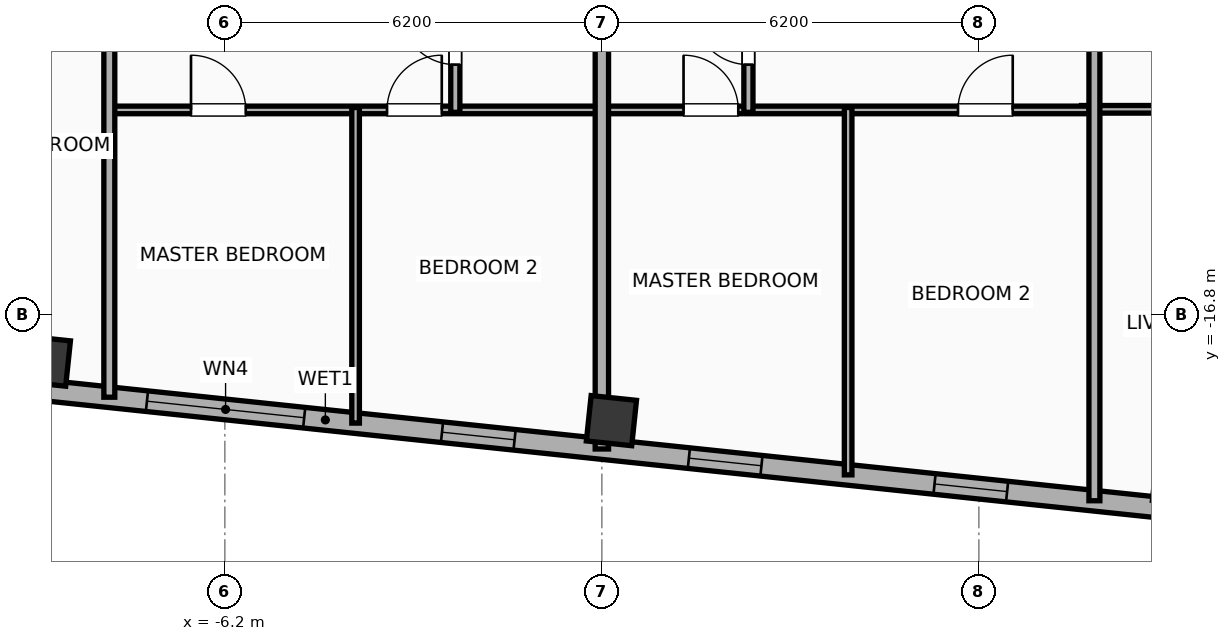
"""IFC4 building model, lengths in metres.
Left out: names, types, materials, properties, quantities, classifications, styles, units other than length and angle.
Written with IfcOpenShell. Run it as: python <this file> out.ifc"""

import sys

from ifc_helpers import new_model, si_unit, direction, frame, frame_2d, origin, origin_2d, place, context, subcontext, project, spatial, rectangle, hollow_rectangle, extrude, element, fill, save


model = new_model("IFC4")
c1 = context("Model", 3, precision=1e-05, world=origin(), true_north=direction((0.0, 1.0)))
c2 = subcontext(c1, "Body", "Model", "MODEL_VIEW")
j1 = project(units=[si_unit("LENGTHUNIT", "METRE"), si_unit("PLANEANGLEUNIT", "RADIAN")], contexts=[c1])
p1 = place(None, origin())
s1 = spatial("IfcSite", under=j1, at=p1, CompositionType="ELEMENT")
p2 = place(p1, origin())
s2 = spatial("IfcBuilding", under=s1, at=p2, CompositionType="ELEMENT")
p3 = place(p2, frame((0.0, 0.0, 295.1)))
s3 = spatial("IfcBuildingStorey", under=s2, at=p3, CompositionType="ELEMENT", Elevation=295.1)
for number, where, z_axis, x_axis in (
    (1, (-9.152, -17.561, 0.0), (0.0, 0.0, 1.0), (0.995, -0.105, 0.0)),
    (2, (0.157, -18.54, 0.0), (0.0, 0.0, 1.0), (0.995, -0.105, 0.0)),
):
    element("IfcColumn", number, at=place(p3, frame(where, z_axis=z_axis, x_axis=x_axis)), inside=s3, PredefinedType="COLUMN", context=c2, shape_type="SweptSolid", body=[
        extrude(hollow_rectangle(XDim=0.75, YDim=0.75, WallThickness=0.025, at=origin_2d()), origin(), (0.0, 0.0, 1.0), 3.9),
    ])
p4 = place(p3, frame((18.708, -20.972, 0.0), z_axis=(0.0, 0.0, 1.0), x_axis=(-0.994521888554, 0.104528528102, 0.0)))
e3 = element("IfcWall", 3, at=p4, inside=s3, PredefinedType="ELEMENTEDWALL", context=c2, shape_type="SweptSolid", body=[
    extrude(rectangle(XDim=46.766, YDim=0.34, at=frame_2d((23.383, 0.0))), origin(), (0.0, 0.0, 1.0), 3.635),
])
p5 = place(p4, frame((23.733, 0.0, 0.65)))
e4 = element("IfcOpeningElement", 4, at=p5, cuts=e3, PredefinedType="OPENING", context=c2, shape_type="SweptSolid", body=[
    extrude(rectangle(XDim=2.6, YDim=2.45, at=frame_2d((1.3, 1.225))), frame((0.0, 0.18, 0.0), z_axis=(0.0, -1.0, 0.0), x_axis=(1.0, 0.0, 0.0)), (0.0, 0.0, 1.0), 0.36),
])
p6 = place(p4, frame((44.402, 0.0, 0.75)))
e5 = element("IfcOpeningElement", 5, at=p6, cuts=e3, PredefinedType="OPENING", context=c2, shape_type="SweptSolid", body=[
    extrude(rectangle(XDim=1.2, YDim=2.05, at=frame_2d((0.6, 1.025))), frame((0.0, 0.18, 0.0), z_axis=(0.0, -1.0, 0.0), x_axis=(1.0, 0.0, 0.0)), (0.0, 0.0, 1.0), 0.36),
])
p7 = place(p4, frame((39.553, 0.0, 0.75)))
e6 = element("IfcOpeningElement", 6, at=p7, cuts=e3, PredefinedType="OPENING", context=c2, shape_type="SweptSolid", body=[
    extrude(rectangle(XDim=1.2, YDim=2.05, at=frame_2d((0.6, 1.025))), frame((0.0, 0.18, 0.0), z_axis=(0.0, -1.0, 0.0), x_axis=(1.0, 0.0, 0.0)), (0.0, 0.0, 1.0), 0.36),
])
p8 = place(p4, frame((42.419, 0.0, 0.75)))
e7 = element("IfcOpeningElement", 7, at=p8, cuts=e3, PredefinedType="OPENING", context=c2, shape_type="SweptSolid", body=[
    extrude(rectangle(XDim=1.2, YDim=2.05, at=frame_2d((0.6, 1.025))), frame((0.0, 0.18, 0.0), z_axis=(0.0, -1.0, 0.0), x_axis=(1.0, 0.0, 0.0)), (0.0, 0.0, 1.0), 0.36),
])
p9 = place(p4, frame((34.933, 0.0, 0.75)))
e8 = element("IfcOpeningElement", 8, at=p9, cuts=e3, PredefinedType="OPENING", context=c2, shape_type="SweptSolid", body=[
    extrude(rectangle(XDim=1.2, YDim=2.05, at=frame_2d((0.6, 1.025))), frame((0.0, 0.18, 0.0), z_axis=(0.0, -1.0, 0.0), x_axis=(1.0, 0.0, 0.0)), (0.0, 0.0, 1.0), 0.36),
])
p10 = place(p4, frame((28.692, 0.0, 0.75)))
e9 = element("IfcOpeningElement", 9, at=p10, cuts=e3, PredefinedType="OPENING", context=c2, shape_type="SweptSolid", body=[
    extrude(rectangle(XDim=1.2, YDim=2.05, at=frame_2d((0.6, 1.025))), frame((0.0, 0.18, 0.0), z_axis=(0.0, -1.0, 0.0), x_axis=(1.0, 0.0, 0.0)), (0.0, 0.0, 1.0), 0.36),
])
p11 = place(p4, frame((30.957, 0.0, 0.75)))
e10 = element("IfcOpeningElement", 10, at=p11, cuts=e3, PredefinedType="OPENING", context=c2, shape_type="SweptSolid", body=[
    extrude(rectangle(XDim=1.2, YDim=2.05, at=frame_2d((0.6, 1.025))), frame((0.0, 0.18, 0.0), z_axis=(0.0, -1.0, 0.0), x_axis=(1.0, 0.0, 0.0)), (0.0, 0.0, 1.0), 0.36),
])
p12 = place(p4, frame((7.495, 0.0, 0.75)))
e11 = element("IfcOpeningElement", 11, at=p12, cuts=e3, PredefinedType="OPENING", context=c2, shape_type="SweptSolid", body=[
    extrude(rectangle(XDim=1.2, YDim=2.05, at=frame_2d((0.6, 1.025))), frame((0.0, 0.18, 0.0), z_axis=(0.0, -1.0, 0.0), x_axis=(1.0, 0.0, 0.0)), (0.0, 0.0, 1.0), 0.36),
])
p13 = place(p4, frame((4.146, 0.0, 0.75)))
e12 = element("IfcOpeningElement", 12, at=p13, cuts=e3, PredefinedType="OPENING", context=c2, shape_type="SweptSolid", body=[
    extrude(rectangle(XDim=1.2, YDim=2.05, at=frame_2d((0.6, 1.025))), frame((0.0, 0.18, 0.0), z_axis=(0.0, -1.0, 0.0), x_axis=(1.0, 0.0, 0.0)), (0.0, 0.0, 1.0), 0.36),
])
p14 = place(p4, frame((1.362, 0.0, 0.75)))
e13 = element("IfcOpeningElement", 13, at=p14, cuts=e3, PredefinedType="OPENING", context=c2, shape_type="SweptSolid", body=[
    extrude(rectangle(XDim=1.2, YDim=2.05, at=frame_2d((0.6, 1.025))), frame((0.0, 0.18, 0.0), z_axis=(0.0, -1.0, 0.0), x_axis=(1.0, 0.0, 0.0)), (0.0, 0.0, 1.0), 0.36),
])
p15 = place(p4, frame((20.254, 0.0, 0.75)))
e14 = element("IfcOpeningElement", 14, at=p15, cuts=e3, PredefinedType="OPENING", context=c2, shape_type="SweptSolid", body=[
    extrude(rectangle(XDim=1.2, YDim=2.05, at=frame_2d((0.6, 1.025))), frame((0.0, 0.18, 0.0), z_axis=(0.0, -1.0, 0.0), x_axis=(1.0, 0.0, 0.0)), (0.0, 0.0, 1.0), 0.36),
])
p16 = place(p4, frame((16.172, 0.0, 0.75)))
e15 = element("IfcOpeningElement", 15, at=p16, cuts=e3, PredefinedType="OPENING", context=c2, shape_type="SweptSolid", body=[
    extrude(rectangle(XDim=1.2, YDim=2.05, at=frame_2d((0.6, 1.025))), frame((0.0, 0.18, 0.0), z_axis=(0.0, -1.0, 0.0), x_axis=(1.0, 0.0, 0.0)), (0.0, 0.0, 1.0), 0.36),
])
p17 = place(p4, frame((12.11, 0.0, 0.75)))
e16 = element("IfcOpeningElement", 16, at=p17, cuts=e3, PredefinedType="OPENING", context=c2, shape_type="SweptSolid", body=[
    extrude(rectangle(XDim=1.2, YDim=2.05, at=frame_2d((0.6, 1.025))), frame((0.0, 0.18, 0.0), z_axis=(0.0, -1.0, 0.0), x_axis=(1.0, 0.0, 0.0)), (0.0, 0.0, 1.0), 0.36),
])
p18 = place(p3, frame((7.887, -13.42, 0.0), z_axis=(0.0, 0.0, 1.0), x_axis=(1.0, 0.0, 0.0)))
e17 = element("IfcWall", 17, at=p18, inside=s3, PredefinedType="PARTITIONING", context=c2, shape_type="SweptSolid", body=[
    extrude(rectangle(XDim=2.623, YDim=0.125, at=frame_2d((1.311, 0.0))), origin(), (0.0, 0.0, 1.0), 3.635),
])
p19 = place(p3, frame((-8.08, -13.43, 0.0), z_axis=(0.0, 0.0, 1.0), x_axis=(1.0, 0.0, 0.0)))
e18 = element("IfcWall", 18, at=p19, inside=s3, PredefinedType="PARTITIONING", context=c2, shape_type="SweptSolid", body=[
    extrude(rectangle(XDim=8.06, YDim=0.125, at=frame_2d((4.03, 0.0))), origin(), (0.0, 0.0, 1.0), 3.635),
])
p20 = place(p19, frame((1.323, 0.0, 0.0)))
e19 = element("IfcOpeningElement", 19, at=p20, cuts=e18, PredefinedType="OPENING", context=c2, shape_type="SweptSolid", body=[
    extrude(rectangle(XDim=0.9, YDim=2.05, at=frame_2d((0.45, 1.025))), frame((0.0, 0.073, 0.0), z_axis=(0.0, -1.0, 0.0), x_axis=(1.0, 0.0, 0.0)), (0.0, 0.0, 1.0), 0.145),
])
p21 = place(p19, frame((4.547, 0.0, 0.0)))
e20 = element("IfcOpeningElement", 20, at=p21, cuts=e18, PredefinedType="OPENING", context=c2, shape_type="SweptSolid", body=[
    extrude(rectangle(XDim=0.9, YDim=2.05, at=frame_2d((0.45, 1.025))), frame((0.0, 0.073, 0.0), z_axis=(0.0, -1.0, 0.0), x_axis=(1.0, 0.0, 0.0)), (0.0, 0.0, 1.0), 0.145),
])
p22 = place(p3, frame((-2.41, -13.47, 0.0), z_axis=(0.0, 0.0, 1.0), x_axis=(0.0, 1.0, 0.0)))
e21 = element("IfcWall", 21, at=p22, inside=s3, PredefinedType="PLUMBINGWALL", context=c2, shape_type="SweptSolid", body=[
    extrude(rectangle(XDim=2.47, YDim=0.15, at=frame_2d((1.235, 0.0))), origin(), (0.0, 0.0, 1.0), 3.635),
])
p23 = place(p22, frame((0.785, 0.0, 0.0)))
e22 = element("IfcOpeningElement", 22, at=p23, cuts=e21, PredefinedType="OPENING", context=c2, shape_type="SweptSolid", body=[
    extrude(rectangle(XDim=0.9, YDim=2.05, at=frame_2d((0.45, 1.025))), frame((0.0, 0.085, 0.0), z_axis=(0.0, -1.0, 0.0), x_axis=(1.0, 0.0, 0.0)), (0.0, 0.0, 1.0), 0.17),
])
p24 = place(p3, frame((-4.05, -18.58, 0.0), z_axis=(0.0, 0.0, 1.0), x_axis=(0.0, 1.0, 0.0)))
e23 = element("IfcWall", 23, at=p24, inside=s3, PredefinedType="PARTITIONING", context=c2, shape_type="SweptSolid", body=[
    extrude(rectangle(XDim=5.19, YDim=0.125, at=frame_2d((2.595, 0.0))), origin(), (0.0, 0.0, 1.0), 3.635),
])
p25 = place(p3, frame((-8.1, -18.155, 0.0), z_axis=(0.0, 0.0, 1.0), x_axis=(0.0, 1.0, 0.0)))
e24 = element("IfcWall", 24, at=p25, inside=s3, PredefinedType="PARTITIONING", context=c2, shape_type="SweptSolid", body=[
    extrude(rectangle(XDim=9.564, YDim=0.18, at=frame_2d((4.782, 0.0))), origin(), (0.0, 0.0, 1.0), 3.635),
])
p26 = place(p25, frame((8.315, 0.0, 0.0)))
e25 = element("IfcOpeningElement", 25, at=p26, cuts=e24, PredefinedType="OPENING", context=c2, shape_type="SweptSolid", body=[
    extrude(rectangle(XDim=0.9, YDim=2.05, at=frame_2d((0.45, 1.025))), frame((0.0, 0.1, 0.0), z_axis=(0.0, -1.0, 0.0), x_axis=(1.0, 0.0, 0.0)), (0.0, 0.0, 1.0), 0.2),
])
p27 = place(p3, frame((0.02, -13.43, 0.0), z_axis=(0.0, 0.0, 1.0), x_axis=(1.0, 0.0, 0.0)))
e26 = element("IfcWall", 26, at=p27, inside=s3, PredefinedType="PARTITIONING", context=c2, shape_type="SweptSolid", body=[
    extrude(rectangle(XDim=7.992, YDim=0.125, at=frame_2d((3.996, 0.0))), origin(), (0.0, 0.0, 1.0), 3.635),
])
p28 = place(p27, frame((1.323, 0.0, 0.0)))
e27 = element("IfcOpeningElement", 27, at=p28, cuts=e26, PredefinedType="OPENING", context=c2, shape_type="SweptSolid", body=[
    extrude(rectangle(XDim=0.9, YDim=2.05, at=frame_2d((0.45, 1.025))), frame((0.0, 0.073, 0.0), z_axis=(0.0, -1.0, 0.0), x_axis=(1.0, 0.0, 0.0)), (0.0, 0.0, 1.0), 0.145),
])
p29 = place(p27, frame((5.837, 0.0, 0.0)))
e28 = element("IfcOpeningElement", 28, at=p29, cuts=e26, PredefinedType="OPENING", context=c2, shape_type="SweptSolid", body=[
    extrude(rectangle(XDim=0.9, YDim=2.05, at=frame_2d((0.45, 1.025))), frame((0.0, 0.073, 0.0), z_axis=(0.0, -1.0, 0.0), x_axis=(1.0, 0.0, 0.0)), (0.0, 0.0, 1.0), 0.145),
])
p30 = place(p3, frame((2.41, -13.47, 0.0), z_axis=(0.0, 0.0, 1.0), x_axis=(0.0, 1.0, 0.0)))
e29 = element("IfcWall", 29, at=p30, inside=s3, PredefinedType="PLUMBINGWALL", context=c2, shape_type="SweptSolid", body=[
    extrude(rectangle(XDim=2.47, YDim=0.15, at=frame_2d((1.235, 0.0))), origin(), (0.0, 0.0, 1.0), 3.075),
])
p31 = place(p30, frame((0.785, 0.0, 0.0)))
e30 = element("IfcOpeningElement", 30, at=p31, cuts=e29, PredefinedType="OPENING", context=c2, shape_type="SweptSolid", body=[
    extrude(rectangle(XDim=0.9, YDim=2.05, at=frame_2d((0.45, 1.025))), frame((0.0, 0.085, 0.0), z_axis=(0.0, -1.0, 0.0), x_axis=(1.0, 0.0, 0.0)), (0.0, 0.0, 1.0), 0.17),
])
p32 = place(p3, frame((4.05, -19.432, 0.0), z_axis=(0.0, 0.0, 1.0), x_axis=(0.0, 1.0, 0.0)))
e31 = element("IfcWall", 31, at=p32, inside=s3, PredefinedType="PARTITIONING", context=c2, shape_type="SweptSolid", body=[
    extrude(rectangle(XDim=6.042, YDim=0.125, at=frame_2d((3.021, 0.0))), origin(), (0.0, 0.0, 1.0), 3.635),
])
p33 = place(p3, frame((8.1, -19.857, 0.0), z_axis=(0.0, 0.0, 1.0), x_axis=(0.0, 1.0, 0.0)))
e32 = element("IfcWall", 32, at=p33, inside=s3, PredefinedType="PARTITIONING", context=c2, shape_type="SweptSolid", body=[
    extrude(rectangle(XDim=11.267, YDim=0.18, at=frame_2d((5.634, 0.0))), origin(), (0.0, 0.0, 1.0), 3.635),
])
p34 = place(p33, frame((10.017, 0.0, 0.0)))
e33 = element("IfcOpeningElement", 33, at=p34, cuts=e32, PredefinedType="OPENING", context=c2, shape_type="SweptSolid", body=[
    extrude(rectangle(XDim=0.9, YDim=2.05, at=frame_2d((0.45, 1.025))), frame((0.0, 0.1, 0.0), z_axis=(0.0, -1.0, 0.0), x_axis=(1.0, 0.0, 0.0)), (0.0, 0.0, 1.0), 0.2),
])
p35 = place(p3, frame((0.0, -19.006, 0.0), z_axis=(0.0, 0.0, 1.0), x_axis=(0.0, 1.0, 0.0)))
e34 = element("IfcWall", 34, at=p35, inside=s3, PredefinedType="PARTITIONING", context=c2, shape_type="SweptSolid", body=[
    extrude(rectangle(XDim=10.416, YDim=0.22, at=frame_2d((5.208, 0.0))), origin(), (0.0, 0.0, 1.0), 3.635),
])
p36 = place(p5, origin())
e35 = element("IfcWindow", 35, at=p36, inside=s3, PartitioningType="SINGLE_PANEL", PredefinedType="WINDOW", context=c2, shape_type="SweptSolid", body=[
    extrude(rectangle(XDim=2.6, YDim=2.45, at=frame_2d((1.3, 1.225))), frame((0.0, 0.03, 0.0), z_axis=(0.0, -1.0, 0.0), x_axis=(1.0, 0.0, 0.0)), (0.0, 0.0, 1.0), 0.06),
])
fill(e4, e35)
p37 = place(p15, origin())
e36 = element("IfcWindow", 36, at=p37, inside=s3, PartitioningType="SINGLE_PANEL", PredefinedType="WINDOW", context=c2, shape_type="SweptSolid", body=[
    extrude(rectangle(XDim=1.2, YDim=2.05, at=frame_2d((0.6, 1.025))), frame((0.0, 0.03, 0.0), z_axis=(0.0, -1.0, 0.0), x_axis=(1.0, 0.0, 0.0)), (0.0, 0.0, 1.0), 0.06),
])
fill(e14, e36)
p38 = place(p16, origin())
e37 = element("IfcWindow", 37, at=p38, inside=s3, PartitioningType="SINGLE_PANEL", PredefinedType="WINDOW", context=c2, shape_type="SweptSolid", body=[
    extrude(rectangle(XDim=1.2, YDim=2.05, at=frame_2d((0.6, 1.025))), frame((0.0, 0.03, 0.0), z_axis=(0.0, -1.0, 0.0), x_axis=(1.0, 0.0, 0.0)), (0.0, 0.0, 1.0), 0.06),
])
fill(e15, e37)
p39 = place(p17, origin())
e38 = element("IfcWindow", 38, at=p39, inside=s3, PartitioningType="SINGLE_PANEL", PredefinedType="WINDOW", context=c2, shape_type="SweptSolid", body=[
    extrude(rectangle(XDim=1.2, YDim=2.05, at=frame_2d((0.6, 1.025))), frame((0.0, 0.03, 0.0), z_axis=(0.0, -1.0, 0.0), x_axis=(1.0, 0.0, 0.0)), (0.0, 0.0, 1.0), 0.06),
])
fill(e16, e38)
p40 = place(p20, origin())
e39 = element("IfcDoor", 39, at=p40, inside=s3, OperationType="SINGLE_SWING_LEFT", PredefinedType="DOOR", context=c2, shape_type="SweptSolid", body=[
    extrude(rectangle(XDim=0.9, YDim=2.05, at=frame_2d((0.45, 1.025))), frame((0.0, 0.025, 0.0), z_axis=(0.0, -1.0, 0.0), x_axis=(1.0, 0.0, 0.0)), (0.0, 0.0, 1.0), 0.05),
])
fill(e19, e39)
p41 = place(p21, origin())
e40 = element("IfcDoor", 40, at=p41, inside=s3, OperationType="SINGLE_SWING_RIGHT", PredefinedType="DOOR", context=c2, shape_type="SweptSolid", body=[
    extrude(rectangle(XDim=0.9, YDim=2.05, at=frame_2d((0.45, 1.025))), frame((0.0, 0.025, 0.0), z_axis=(0.0, -1.0, 0.0), x_axis=(1.0, 0.0, 0.0)), (0.0, 0.0, 1.0), 0.05),
])
fill(e20, e40)
p42 = place(p23, origin())
e41 = element("IfcDoor", 41, at=p42, inside=s3, OperationType="SINGLE_SWING_RIGHT", PredefinedType="DOOR", context=c2, shape_type="SweptSolid", body=[
    extrude(rectangle(XDim=0.9, YDim=2.05, at=frame_2d((0.45, 1.025))), frame((0.0, 0.025, 0.0), z_axis=(0.0, -1.0, 0.0), x_axis=(1.0, 0.0, 0.0)), (0.0, 0.0, 1.0), 0.05),
])
fill(e22, e41)
p43 = place(p28, origin())
e42 = element("IfcDoor", 42, at=p43, inside=s3, OperationType="SINGLE_SWING_LEFT", PredefinedType="DOOR", context=c2, shape_type="SweptSolid", body=[
    extrude(rectangle(XDim=0.9, YDim=2.05, at=frame_2d((0.45, 1.025))), frame((0.0, 0.025, 0.0), z_axis=(0.0, -1.0, 0.0), x_axis=(1.0, 0.0, 0.0)), (0.0, 0.0, 1.0), 0.05),
])
fill(e27, e42)
p44 = place(p29, origin())
e43 = element("IfcDoor", 43, at=p44, inside=s3, OperationType="SINGLE_SWING_RIGHT", PredefinedType="DOOR", context=c2, shape_type="SweptSolid", body=[
    extrude(rectangle(XDim=0.9, YDim=2.05, at=frame_2d((0.45, 1.025))), frame((0.0, 0.025, 0.0), z_axis=(0.0, -1.0, 0.0), x_axis=(1.0, 0.0, 0.0)), (0.0, 0.0, 1.0), 0.05),
])
fill(e28, e43)
p45 = place(p31, origin())
e44 = element("IfcDoor", 44, at=p45, inside=s3, OperationType="SINGLE_SWING_RIGHT", PredefinedType="DOOR", context=c2, shape_type="SweptSolid", body=[
    extrude(rectangle(XDim=0.9, YDim=2.05, at=frame_2d((0.45, 1.025))), frame((0.0, 0.025, 0.0), z_axis=(0.0, -1.0, 0.0), x_axis=(1.0, 0.0, 0.0)), (0.0, 0.0, 1.0), 0.05),
])
fill(e30, e44)
save(model, sys.argv[1])
